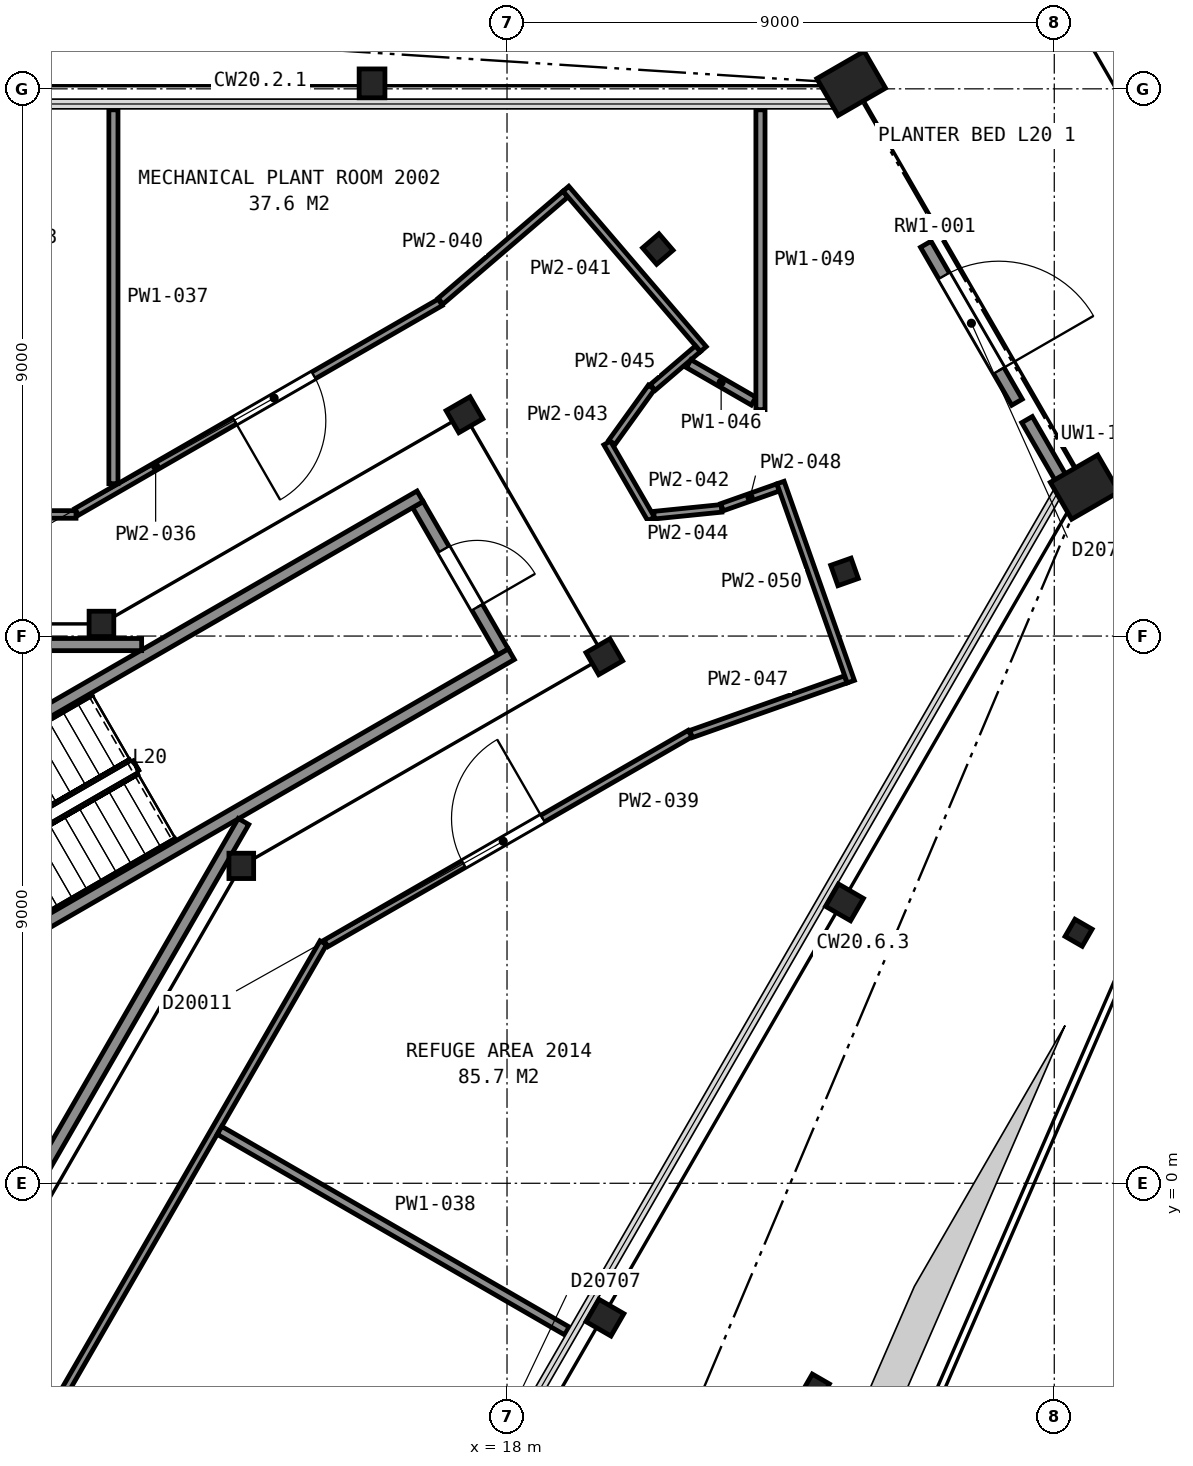
"""IFC4 building model, lengths in metres.
Left out: names, types, materials, properties, quantities, classifications, styles, units other than length and angle.
Written with IfcOpenShell. Run it as: python <this file> out.ifc"""

import sys

from ifc_helpers import new_model, si_unit, direction, frame, frame_2d, origin, origin_2d, place, context, subcontext, project, spatial, rectangle, hollow_rectangle, hollow_circle, i_section, extrude, element, fill, save


model = new_model("IFC4")
c1 = context("Model", 3, precision=1e-05, world=origin(), true_north=direction((0.0, 1.0)))
c2 = subcontext(c1, "Body", "Model", "MODEL_VIEW")
j1 = project(units=[si_unit("LENGTHUNIT", "METRE"), si_unit("PLANEANGLEUNIT", "RADIAN")], contexts=[c1])
p1 = place(None, origin())
s1 = spatial("IfcSite", under=j1, at=p1, CompositionType="ELEMENT")
p2 = place(p1, origin())
s2 = spatial("IfcBuilding", under=s1, at=p2, CompositionType="ELEMENT")
p3 = place(p2, frame((0.0, 0.0, 87.2)))
s3 = spatial("IfcBuildingStorey", under=s2, at=p3, CompositionType="ELEMENT", Elevation=87.2)
p4 = place(p3, frame((23.66, 18.09, -0.16), z_axis=(0.0, 0.0, 1.0), x_axis=(0.5, -0.866025403784, 0.0)))
e1 = element("IfcColumn", 1, at=p4, inside=s3, PredefinedType="COLUMN", context=c2, shape_type="SweptSolid", body=[
    extrude(hollow_rectangle(XDim=0.7, YDim=0.9, WallThickness=0.065, at=origin_2d()), origin(), (0.0, 0.0, 1.0), 5.76),
])
for number, where, z_axis, x_axis in (
    (2, (15.78, 18.09, -0.16), (0.0, 0.0, 1.0), (1.0, 0.0, 0.0)),
    (3, (19.61, -2.21, -0.16), (0.0, 0.0, 1.0), (-0.5, -0.866, 0.0)),
    (4, (23.55, 4.62, -0.16), (0.0, 0.0, 1.0), (-0.5, -0.866, 0.0)),
):
    element("IfcColumn", number, at=place(p3, frame(where, z_axis=z_axis, x_axis=x_axis)), inside=s3, PredefinedType="COLUMN", context=c2, shape_type="SweptSolid", body=[
        extrude(i_section(OverallWidth=0.424, OverallDepth=0.475, WebThickness=0.048, FlangeThickness=0.077, FilletRadius=0.015, at=origin_2d()), origin(), (0.0, 0.0, 1.0), 5.76),
    ])
p5 = place(p3, frame((27.5, 11.45, -0.16), z_axis=(0.0, 0.0, 1.0), x_axis=(0.5, -0.866025403784, 0.0)))
e5 = element("IfcColumn", 5, at=p5, inside=s3, PredefinedType="COLUMN", context=c2, shape_type="SweptSolid", body=[
    extrude(hollow_rectangle(XDim=0.7, YDim=0.9, WallThickness=0.065, at=origin_2d()), origin(), (0.0, 0.0, 1.0), 5.76),
])
p6 = place(p3, frame((13.63, 5.22, 0.0), z_axis=(0.0, 0.0, 1.0), x_axis=(1.0, 0.0, 0.0)))
e6 = element("IfcColumn", 6, at=p6, inside=s3, PredefinedType="COLUMN", context=c2, shape_type="SweptSolid", body=[
    extrude(i_section(OverallWidth=0.406, OverallDepth=0.417, WebThickness=0.03, FlangeThickness=0.048, FilletRadius=0.015, at=origin_2d()), origin(), (0.0, 0.0, 1.0), 5.6),
])
for number, where, z_axis, x_axis in (
    (7, (19.6, 8.66, 0.0), (0.0, 0.0, 1.0), (0.5, -0.866, 0.0)),
    (8, (17.3, 12.64, 0.0), (0.0, 0.0, 1.0), (0.5, -0.866, 0.0)),
):
    element("IfcColumn", number, at=place(p3, frame(where, z_axis=z_axis, x_axis=x_axis)), inside=s3, PredefinedType="COLUMN", context=c2, shape_type="SweptSolid", body=[
        extrude(i_section(OverallWidth=0.419, OverallDepth=0.455, WebThickness=0.042, FlangeThickness=0.068, FilletRadius=0.015, at=origin_2d()), origin(), (0.0, 0.0, 1.0), 5.6),
    ])
p7 = place(p3, frame((11.33, 9.2, 0.0), z_axis=(0.0, 0.0, 1.0), x_axis=(1.0, 0.0, 0.0)))
e9 = element("IfcColumn", 9, at=p7, inside=s3, PredefinedType="COLUMN", context=c2, shape_type="SweptSolid", body=[
    extrude(i_section(OverallWidth=0.406, OverallDepth=0.417, WebThickness=0.03, FlangeThickness=0.048, FilletRadius=0.015, at=origin_2d()), origin(), (0.0, 0.0, 1.0), 5.6),
])
for number, where, z_axis, x_axis in (
    (10, (23.08, -3.36, -0.73), (0.0, 0.0, 1.0), (-0.5, -0.866, 0.0)),
    (11, (27.4, 4.12, -0.73), (0.0, 0.0, 1.0), (-0.5, -0.866, 0.0)),
):
    element("IfcColumn", number, at=place(p3, frame(where, z_axis=z_axis, x_axis=x_axis)), inside=s3, PredefinedType="COLUMN", context=c2, shape_type="SweptSolid", body=[
        extrude(hollow_circle(Radius=0.163, WallThickness=0.013, at=origin_2d()), origin(), (0.0, 0.0, 1.0), 5.17),
    ])
for number, where, z_axis, x_axis in (
    (12, (23.55, 10.055, -0.16), (0.0, 0.0, 1.0), (-0.333, 0.943, 0.0)),
    (13, (20.48, 15.365, -0.16), (0.0, 0.0, 1.0), (-0.651, 0.759, 0.0)),
):
    element("IfcColumn", number, at=place(p3, frame(where, z_axis=z_axis, x_axis=x_axis)), inside=s3, PredefinedType="COLUMN", context=c2, shape_type="SweptSolid", body=[
        extrude(hollow_rectangle(XDim=0.356, YDim=0.356, WallThickness=0.013, InnerFilletRadius=0.006, OuterFilletRadius=0.019, at=origin_2d()), origin(), (0.0, 0.0, 1.0), 5.6),
    ])
p8 = place(p3, frame((26.387, 12.846, 0.0), z_axis=(0.0, 0.0, 1.0), x_axis=(-0.499990139034, 0.866031096941, 0.0)))
e14 = element("IfcWall", 14, at=p8, inside=s3, PredefinedType="SOLIDWALL", context=c2, shape_type="SweptSolid", body=[
    extrude(rectangle(XDim=3.0, YDim=0.2, at=frame_2d((1.5, 0.0))), origin(), (0.0, 0.0, 1.0), 4.323),
])
p9 = place(p8, frame((0.6, 0.0, 0.0)))
e15 = element("IfcOpeningElement", 15, at=p9, cuts=e14, PredefinedType="OPENING", context=c2, shape_type="SweptSolid", body=[
    extrude(rectangle(XDim=1.8, YDim=2.4, at=frame_2d((0.9, 1.2))), frame((0.0, 0.11, 0.0), z_axis=(0.0, -1.0, 0.0), x_axis=(1.0, 0.0, 0.0)), (0.0, 0.0, 1.0), 0.22),
])
p10 = place(p3, frame((27.15, 11.524, 0.0), z_axis=(0.0, 0.0, 1.0), x_axis=(-0.499934333537, 0.866063313015, 0.0)))
e16 = element("IfcWall", 16, at=p10, inside=s3, PredefinedType="SOLIDWALL", context=c2, shape_type="SweptSolid", body=[
    extrude(rectangle(XDim=1.197, YDim=0.2, at=frame_2d((0.599, 0.0))), origin(), (0.0, 0.0, 1.0), 0.9),
])
p11 = place(p3, frame((17.934, 8.738, 0.0), z_axis=(0.0, 0.0, 1.0), x_axis=(-0.49998411664, 0.866034573852, 0.0)))
e17 = element("IfcWall", 17, at=p11, inside=s3, PredefinedType="PARTITIONING", context=c2, shape_type="SweptSolid", body=[
    extrude(rectangle(XDim=2.8, YDim=0.2, at=frame_2d((1.4, 0.0))), origin(), (0.0, 0.0, 1.0), 5.35),
])
p12 = place(p11, frame((0.85, 0.0, 0.0)))
e18 = element("IfcOpeningElement", 18, at=p12, cuts=e17, PredefinedType="OPENING", context=c2, shape_type="SweptSolid", body=[
    extrude(rectangle(XDim=1.1, YDim=2.1, at=frame_2d((0.55, 1.05))), frame((0.0, 0.11, 0.0), z_axis=(0.0, -1.0, 0.0), x_axis=(1.0, 0.0, 0.0)), (0.0, 0.0, 1.0), 0.22),
])
for number, where, z_axis, x_axis in (
    (19, (6.178, 5.299, 0.0), (0.0, 0.0, 1.0), (0.866, 0.5, 0.0)),
    (20, (7.678, 2.701, 0.0), (0.0, 0.0, 1.0), (0.866, 0.5, 0.0)),
):
    element("IfcWall", number, at=place(p3, frame(where, z_axis=z_axis, x_axis=x_axis)), inside=s3, PredefinedType="PARTITIONING", context=c2, shape_type="SweptSolid", body=[
        extrude(rectangle(XDim=12.0, YDim=0.2, at=frame_2d((6.0, 0.0))), origin(), (0.0, 0.0, 1.0), 5.35),
    ])
p13 = place(p3, frame((6.177, 8.86, 0.0), z_axis=(0.0, 0.0, 1.0), x_axis=(1.0, 0.0, 0.0)))
e21 = element("IfcWall", 21, at=p13, inside=s3, PredefinedType="PARTITIONING", context=c2, shape_type="SweptSolid", body=[
    extrude(rectangle(XDim=5.814, YDim=0.2, at=frame_2d((2.907, 0.0))), origin(), (0.0, 0.0, 1.0), 5.35),
])
p14 = place(p3, frame((8.492, -3.012, 0.0), z_axis=(0.0, 0.0, 1.0), x_axis=(0.499972957231, 0.866041016371, 0.0)))
e22 = element("IfcWall", 22, at=p14, inside=s3, PredefinedType="PARTITIONING", context=c2, shape_type="SweptSolid", body=[
    extrude(rectangle(XDim=10.349, YDim=0.2, at=frame_2d((5.174, 0.0))), origin(), (0.0, 0.0, 1.0), 5.35),
])
p15 = place(p3, frame((-10.912, 11.0, 0.0), z_axis=(0.0, 0.0, 1.0), x_axis=(1.0, 0.0, 0.0)))
e23 = element("IfcWall", 23, at=p15, inside=s3, PredefinedType="PARTITIONING", context=c2, shape_type="SweptSolid", body=[
    extrude(rectangle(XDim=21.823, YDim=0.125, at=frame_2d((10.912, 0.0))), origin(), (0.0, 0.0, 1.0), 4.262),
])
p16 = place(p15, frame((17.946, 0.0, 0.0)))
e24 = element("IfcOpeningElement", 24, at=p16, cuts=e23, PredefinedType="OPENING", context=c2, shape_type="SweptSolid", body=[
    extrude(rectangle(XDim=1.2, YDim=2.1, at=frame_2d((0.6, 1.05))), frame((0.0, 0.073, 0.0), z_axis=(0.0, -1.0, 0.0), x_axis=(1.0, 0.0, 0.0)), (0.0, 0.0, 1.0), 0.145),
])
p17 = place(p15, frame((12.074, 0.0, 0.0)))
e25 = element("IfcOpeningElement", 25, at=p17, cuts=e23, PredefinedType="OPENING", context=c2, shape_type="SweptSolid", body=[
    extrude(rectangle(XDim=1.2, YDim=2.1, at=frame_2d((0.6, 1.05))), frame((0.0, 0.073, 0.0), z_axis=(0.0, -1.0, 0.0), x_axis=(1.0, 0.0, 0.0)), (0.0, 0.0, 1.0), 0.145),
])
p18 = place(p15, frame((4.312, 0.0, 0.0)))
e26 = element("IfcOpeningElement", 26, at=p18, cuts=e23, PredefinedType="OPENING", context=c2, shape_type="SweptSolid", body=[
    extrude(rectangle(XDim=1.5, YDim=2.1, at=frame_2d((0.75, 1.05))), frame((0.0, 0.073, 0.0), z_axis=(0.0, -1.0, 0.0), x_axis=(1.0, 0.0, 0.0)), (0.0, 0.0, 1.0), 0.145),
])
p19 = place(p3, frame((14.979, 3.956, 0.0), z_axis=(0.0, 0.0, 1.0), x_axis=(-0.499707610415, -0.866194149191, 0.0)))
e27 = element("IfcWall", 27, at=p19, inside=s3, PredefinedType="PARTITIONING", context=c2, shape_type="SweptSolid", body=[
    extrude(rectangle(XDim=21.833, YDim=0.125, at=frame_2d((10.917, 0.0))), origin(), (0.0, 0.0, 1.0), 4.262),
])
p20 = place(p19, frame((10.156, 0.0, 0.0)))
e28 = element("IfcOpeningElement", 28, at=p20, cuts=e27, PredefinedType="OPENING", context=c2, shape_type="SweptSolid", body=[
    extrude(rectangle(XDim=1.5, YDim=2.1, at=frame_2d((0.75, 1.05))), frame((0.0, 0.073, 0.0), z_axis=(0.0, -1.0, 0.0), x_axis=(1.0, 0.0, 0.0)), (0.0, 0.0, 1.0), 0.145),
])
p21 = place(p3, frame((10.923, 11.042, 0.0), z_axis=(0.0, 0.0, 1.0), x_axis=(0.866404548649, 0.499342726071, 0.0)))
e29 = element("IfcWall", 29, at=p21, inside=s3, PredefinedType="PARTITIONING", context=c2, shape_type="SweptSolid", body=[
    extrude(rectangle(XDim=6.903, YDim=0.125, at=frame_2d((3.451, 0.0))), origin(), (0.0, 0.0, 1.0), 4.262),
])
p22 = place(p21, frame((2.998, 0.0, 0.0)))
e30 = element("IfcOpeningElement", 30, at=p22, cuts=e29, PredefinedType="OPENING", context=c2, shape_type="SweptSolid", body=[
    extrude(rectangle(XDim=1.5, YDim=2.1, at=frame_2d((0.75, 1.05))), frame((0.0, 0.073, 0.0), z_axis=(0.0, -1.0, 0.0), x_axis=(1.0, 0.0, 0.0)), (0.0, 0.0, 1.0), 0.145),
])
p23 = place(p3, frame((11.527, 11.506, 0.0), z_axis=(0.0, 0.0, 1.0), x_axis=(0.0, 1.0, 0.0)))
e31 = element("IfcWall", 31, at=p23, inside=s3, PredefinedType="PARTITIONING", context=c2, shape_type="SweptSolid", body=[
    extrude(rectangle(XDim=6.149, YDim=0.15, at=frame_2d((3.074, 0.0))), origin(), (0.0, 0.0, 1.0), 4.262),
])
p24 = place(p3, frame((13.272, 0.87, 0.0), z_axis=(0.0, 0.0, 1.0), x_axis=(0.866070944917, -0.499921112148, 0.0)))
e32 = element("IfcWall", 32, at=p24, inside=s3, PredefinedType="PARTITIONING", context=c2, shape_type="SweptSolid", body=[
    extrude(rectangle(XDim=6.596, YDim=0.15, at=frame_2d((3.298, 0.0))), origin(), (0.0, 0.0, 1.0), 4.262),
])
p25 = place(p3, frame((21.01, 7.395, 0.0), z_axis=(0.0, 0.0, 1.0), x_axis=(-0.866435403895, -0.49928918562, 0.0)))
e33 = element("IfcWall", 33, at=p25, inside=s3, PredefinedType="PARTITIONING", context=c2, shape_type="SweptSolid", body=[
    extrude(rectangle(XDim=6.912, YDim=0.125, at=frame_2d((3.456, 0.0))), origin(), (0.0, 0.0, 1.0), 4.262),
])
p26 = place(p25, frame((2.797, 0.0, 0.0)))
e34 = element("IfcOpeningElement", 34, at=p26, cuts=e33, PredefinedType="OPENING", context=c2, shape_type="SweptSolid", body=[
    extrude(rectangle(XDim=1.5, YDim=2.1, at=frame_2d((0.75, 1.05))), frame((0.0, 0.073, 0.0), z_axis=(0.0, -1.0, 0.0), x_axis=(1.0, 0.0, 0.0)), (0.0, 0.0, 1.0), 0.145),
])
p27 = place(p3, frame((16.906, 14.507, 0.0), z_axis=(0.0, 0.0, 1.0), x_axis=(0.759180150355, 0.650880556866, 0.0)))
e35 = element("IfcWall", 35, at=p27, inside=s3, PredefinedType="PARTITIONING", context=c2, shape_type="SweptSolid", body=[
    extrude(rectangle(XDim=2.705, YDim=0.125, at=frame_2d((1.353, 0.0))), origin(), (0.0, 0.0, 1.0), 4.262),
])
p28 = place(p3, frame((18.968, 16.357, 0.0), z_axis=(0.0, 0.0, 1.0), x_axis=(0.650692980458, -0.759340928162, 0.0)))
e36 = element("IfcWall", 36, at=p28, inside=s3, PredefinedType="PARTITIONING", context=c2, shape_type="SweptSolid", body=[
    extrude(rectangle(XDim=3.474, YDim=0.125, at=frame_2d((1.737, 0.0))), origin(), (0.0, 0.0, 1.0), 4.262),
])
p29 = place(p3, frame((19.647, 12.176, 0.0), z_axis=(0.0, 0.0, 1.0), x_axis=(0.500429691499, -0.865777179109, 0.0)))
e37 = element("IfcWall", 37, at=p29, inside=s3, PredefinedType="PARTITIONING", context=c2, shape_type="SweptSolid", body=[
    extrude(rectangle(XDim=1.444, YDim=0.125, at=frame_2d((0.722, 0.0))), origin(), (0.0, 0.0, 1.0), 4.262),
])
p30 = place(p3, frame((19.725, 12.187, 0.0), z_axis=(0.0, 0.0, 1.0), x_axis=(0.584241196602, 0.811580078731, 0.0)))
e38 = element("IfcWall", 38, at=p30, inside=s3, PredefinedType="PARTITIONING", context=c2, shape_type="SweptSolid", body=[
    extrude(rectangle(XDim=1.114, YDim=0.125, at=frame_2d((0.557, 0.0))), origin(), (0.0, 0.0, 1.0), 4.262),
])
p31 = place(p3, frame((20.417, 10.988, 0.0), z_axis=(0.0, 0.0, 1.0), x_axis=(0.994917271195, 0.100695697415, 0.0)))
e39 = element("IfcWall", 39, at=p31, inside=s3, PredefinedType="PARTITIONING", context=c2, shape_type="SweptSolid", body=[
    extrude(rectangle(XDim=1.115, YDim=0.125, at=frame_2d((0.558, 0.0))), origin(), (0.0, 0.0, 1.0), 4.262),
])
p32 = place(p3, frame((20.396, 13.089, 0.0), z_axis=(0.0, 0.0, 1.0), x_axis=(0.759679514404, 0.650297651383, 0.0)))
e40 = element("IfcWall", 40, at=p32, inside=s3, PredefinedType="PARTITIONING", context=c2, shape_type="SweptSolid", body=[
    extrude(rectangle(XDim=0.978, YDim=0.125, at=frame_2d((0.489, 0.0))), origin(), (0.0, 0.0, 1.0), 4.262),
])
p33 = place(p3, frame((20.987, 13.481, 0.0), z_axis=(0.0, 0.0, 1.0), x_axis=(0.86601746898, -0.500013743233, 0.0)))
e41 = element("IfcWall", 41, at=p33, inside=s3, PredefinedType="PARTITIONING", context=c2, shape_type="SweptSolid", body=[
    extrude(rectangle(XDim=1.233, YDim=0.15, at=frame_2d((0.617, 0.0))), origin(), (0.0, 0.0, 1.0), 4.262),
])
p34 = place(p3, frame((21.027, 7.389, 0.0), z_axis=(0.0, 0.0, 1.0), x_axis=(0.942973633361, 0.332867431249, 0.0)))
e42 = element("IfcWall", 42, at=p34, inside=s3, PredefinedType="PARTITIONING", context=c2, shape_type="SweptSolid", body=[
    extrude(rectangle(XDim=2.699, YDim=0.125, at=frame_2d((1.35, 0.0))), origin(), (0.0, 0.0, 1.0), 4.262),
])
p35 = place(p3, frame((21.536, 11.119, 0.0), z_axis=(0.0, 0.0, 1.0), x_axis=(0.942994942742, 0.332807058161, 0.0)))
e43 = element("IfcWall", 43, at=p35, inside=s3, PredefinedType="PARTITIONING", context=c2, shape_type="SweptSolid", body=[
    extrude(rectangle(XDim=0.978, YDim=0.125, at=frame_2d((0.489, 0.0))), origin(), (0.0, 0.0, 1.0), 4.262),
])
p36 = place(p3, frame((22.168, 12.724, 0.0), z_axis=(0.0, 0.0, 1.0), x_axis=(0.0, 1.0, 0.0)))
e44 = element("IfcWall", 44, at=p36, inside=s3, PredefinedType="PARTITIONING", context=c2, shape_type="SweptSolid", body=[
    extrude(rectangle(XDim=4.931, YDim=0.15, at=frame_2d((2.465, 0.0))), origin(), (0.0, 0.0, 1.0), 4.262),
])
p37 = place(p3, frame((22.498, 11.525, 0.0), z_axis=(0.0, 0.0, 1.0), x_axis=(0.332735538655, -0.943020180757, 0.0)))
e45 = element("IfcWall", 45, at=p37, inside=s3, PredefinedType="PARTITIONING", context=c2, shape_type="SweptSolid", body=[
    extrude(rectangle(XDim=3.473, YDim=0.125, at=frame_2d((1.736, 0.0))), origin(), (0.0, 0.0, 1.0), 4.262),
])
p38 = place(p9, frame((1.8, 0.0, 0.0), z_axis=(0.0, 0.0, 1.0), x_axis=(-1.0, 0.0, 0.0)))
e46 = element("IfcDoor", 46, at=p38, inside=s3, OperationType="DOUBLE_DOOR_SINGLE_SWING", PredefinedType="DOOR", context=c2, shape_type="SweptSolid", body=[
    extrude(rectangle(XDim=1.8, YDim=2.4, at=frame_2d((0.9, 1.2))), frame((0.0, 0.025, 0.0), z_axis=(0.0, -1.0, 0.0), x_axis=(1.0, 0.0, 0.0)), (0.0, 0.0, 1.0), 0.05),
])
fill(e15, e46)
p39 = place(p12, origin())
e47 = element("IfcDoor", 47, at=p39, inside=s3, OperationType="SINGLE_SWING_LEFT", PredefinedType="DOOR", context=c2, shape_type="SweptSolid", body=[
    extrude(rectangle(XDim=1.1, YDim=2.1, at=frame_2d((0.55, 1.05))), frame((0.0, 0.025, 0.0), z_axis=(0.0, -1.0, 0.0), x_axis=(1.0, 0.0, 0.0)), (0.0, 0.0, 1.0), 0.05),
])
fill(e18, e47)
p40 = place(p22, origin())
e48 = element("IfcDoor", 48, at=p40, inside=s3, OperationType="DOUBLE_DOOR_SINGLE_SWING", PredefinedType="DOOR", context=c2, shape_type="SweptSolid", body=[
    extrude(rectangle(XDim=1.5, YDim=2.1, at=frame_2d((0.75, 1.05))), frame((0.0, 0.025, 0.0), z_axis=(0.0, -1.0, 0.0), x_axis=(1.0, 0.0, 0.0)), (0.0, 0.0, 1.0), 0.05),
])
fill(e30, e48)
p41 = place(p26, origin())
e49 = element("IfcDoor", 49, at=p41, inside=s3, OperationType="DOUBLE_DOOR_SINGLE_SWING", PredefinedType="DOOR", context=c2, shape_type="SweptSolid", body=[
    extrude(rectangle(XDim=1.5, YDim=2.1, at=frame_2d((0.75, 1.05))), frame((0.0, 0.025, 0.0), z_axis=(0.0, -1.0, 0.0), x_axis=(1.0, 0.0, 0.0)), (0.0, 0.0, 1.0), 0.05),
])
fill(e34, e49)
save(model, sys.argv[1])
